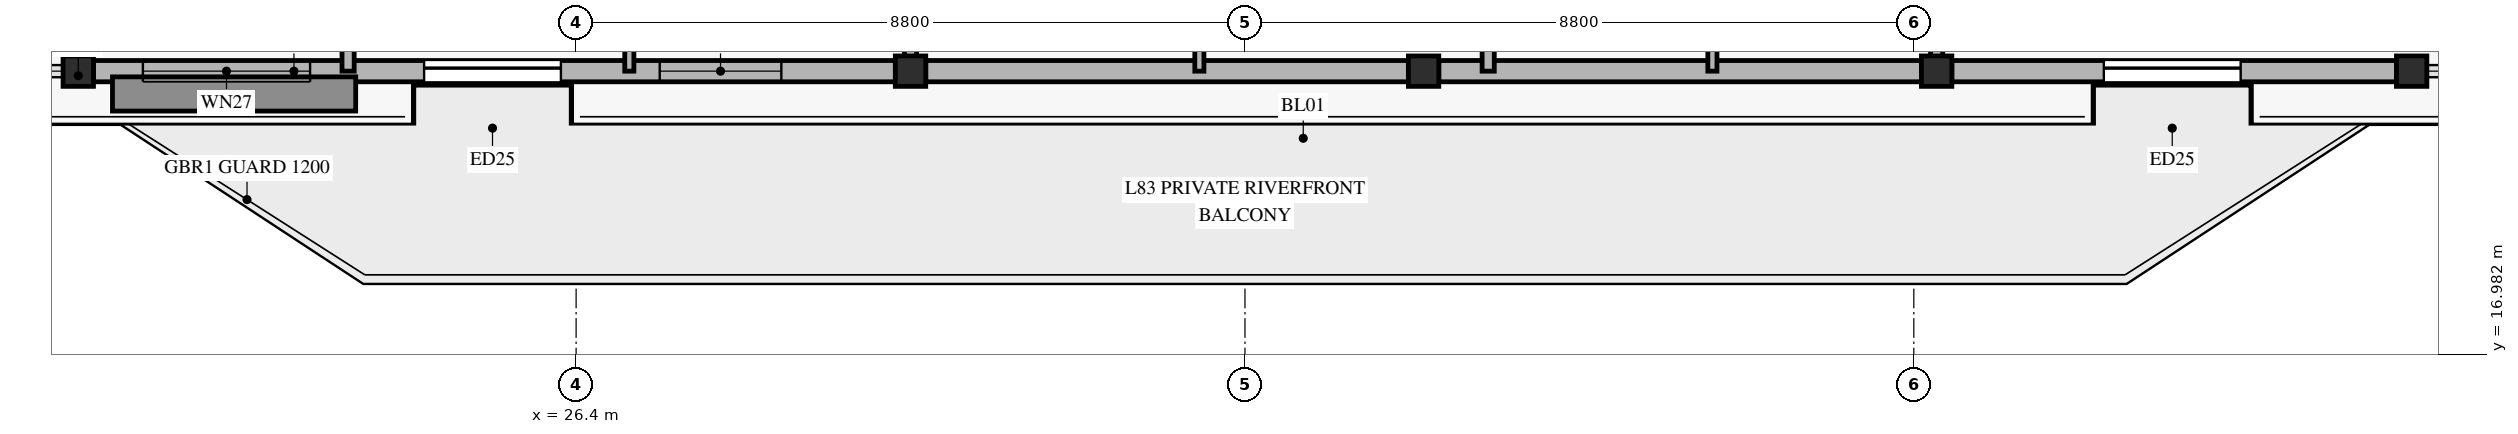
"""IFC4 building model, lengths in metres.
Left out: names, types, materials, properties, quantities, classifications, styles, units other than length and angle.
Written with IfcOpenShell. Run it as: python <this file> out.ifc"""

import sys

from ifc_helpers import new_model, si_unit, direction, frame, frame_2d, origin, origin_2d, place, context, subcontext, project, spatial, rectangle, hollow_rectangle, extrude, source, transform, mapped, element, fill, save


model = new_model("IFC4")
c1 = context("Model", 3, precision=1e-05, world=origin(), true_north=direction((0.0, 1.0)))
c2 = subcontext(c1, "Body", "Model", "MODEL_VIEW")
j1 = project(units=[si_unit("LENGTHUNIT", "METRE"), si_unit("PLANEANGLEUNIT", "RADIAN")], contexts=[c1])
p1 = place(None, origin())
s1 = spatial("IfcSite", under=j1, at=p1, CompositionType="ELEMENT")
p2 = place(p1, origin())
s2 = spatial("IfcBuilding", under=s1, at=p2, CompositionType="ELEMENT")
p3 = place(p2, frame((0.0, 0.0, 321.0)))
s3 = spatial("IfcBuildingStorey", under=s2, at=p3, CompositionType="ELEMENT", Elevation=321.0)
m1 = source(origin(), c2, "Body", "SweptSolid", [
    extrude(hollow_rectangle(XDim=0.4, YDim=0.4, WallThickness=0.02, at=origin_2d()), origin(), (0.0, 0.0, 1.0), 3.319),
])
for number, where, z_axis, x_axis in (
    (1, (19.85, 20.704, 0.0), (0.0, 0.281, 0.96), (-1.0, 0.0, 0.0)),
    (2, (30.8, 20.704, 0.0), (0.0, 0.281, 0.96), (-1.0, 0.0, 0.0)),
    (3, (37.55, 20.704, 0.0), (0.0, 0.281, 0.96), (-1.0, 0.0, 0.0)),
    (4, (44.3, 20.704, 0.0), (0.0, 0.281, 0.96), (-1.0, 0.0, 0.0)),
    (5, (50.55, 20.704, 0.0), (0.0, 0.281, 0.96), (-1.0, 0.0, 0.0)),
):
    element("IfcColumn", number, at=place(p3, frame(where, z_axis=z_axis, x_axis=x_axis)), inside=s3, PredefinedType="COLUMN", context=c2, shape_type="MappedRepresentation", body=[
        mapped(m1, transform((0.0, 0.0, 0.0), x_axis=(1.0, 0.0, 0.0), y_axis=(0.0, 1.0, 0.0), z_axis=(0.0, 0.0, 1.0), scale=1.0)),
    ])
p4 = place(p3, frame((20.05, 20.704, 0.0), z_axis=(0.0, 0.0, 1.0), x_axis=(1.0, 0.0, 0.0)))
e6 = element("IfcWall", 6, at=p4, inside=s3, PredefinedType="SOLIDWALL", context=c2, shape_type="SweptSolid", body=[
    extrude(rectangle(XDim=10.55, YDim=0.28, at=frame_2d((5.275, 0.0))), origin(), (0.0, 0.0, 1.0), 2.815),
])
p5 = place(p4, frame((4.35, 0.0, 0.0)))
e7 = element("IfcOpeningElement", 7, at=p5, cuts=e6, PredefinedType="OPENING", context=c2, shape_type="SweptSolid", body=[
    extrude(rectangle(XDim=1.8, YDim=2.25, at=frame_2d((0.9, 1.125))), frame((0.0, 0.15, 0.0), z_axis=(0.0, -1.0, 0.0), x_axis=(1.0, 0.0, 0.0)), (0.0, 0.0, 1.0), 0.3),
])
p6 = place(p4, frame((0.65, 0.0, 0.45)))
e8 = element("IfcOpeningElement", 8, at=p6, cuts=e6, PredefinedType="OPENING", context=c2, shape_type="SweptSolid", body=[
    extrude(rectangle(XDim=2.2, YDim=2.1, at=frame_2d((1.1, 1.05))), frame((0.0, 0.15, 0.0), z_axis=(0.0, -1.0, 0.0), x_axis=(1.0, 0.0, 0.0)), (0.0, 0.0, 1.0), 0.3),
])
p7 = place(p4, frame((7.45, 0.0, 0.45)))
e9 = element("IfcOpeningElement", 9, at=p7, cuts=e6, PredefinedType="OPENING", context=c2, shape_type="SweptSolid", body=[
    extrude(rectangle(XDim=1.6, YDim=2.0, at=frame_2d((0.8, 1.0))), frame((0.0, 0.15, 0.0), z_axis=(0.0, -1.0, 0.0), x_axis=(1.0, 0.0, 0.0)), (0.0, 0.0, 1.0), 0.3),
])
for number, where, z_axis, x_axis in (
    (10, (31.0, 20.704, 0.0), (0.0, 0.0, 1.0), (1.0, 0.0, 0.0)),
    (11, (37.75, 20.704, 0.0), (0.0, 0.0, 1.0), (1.0, 0.0, 0.0)),
):
    element("IfcWall", number, at=place(p3, frame(where, z_axis=z_axis, x_axis=x_axis)), inside=s3, PredefinedType="SOLIDWALL", context=c2, shape_type="SweptSolid", body=[
        extrude(rectangle(XDim=6.35, YDim=0.28, at=frame_2d((3.175, 0.0))), origin(), (0.0, 0.0, 1.0), 2.815),
    ])
p8 = place(p3, frame((44.5, 20.704, 0.0), z_axis=(0.0, 0.0, 1.0), x_axis=(1.0, 0.0, 0.0)))
e12 = element("IfcWall", 12, at=p8, inside=s3, PredefinedType="SOLIDWALL", context=c2, shape_type="SweptSolid", body=[
    extrude(rectangle(XDim=5.85, YDim=0.28, at=frame_2d((2.925, 0.0))), origin(), (0.0, 0.0, 1.0), 2.815),
])
p9 = place(p8, frame((2.0, 0.0, 0.0)))
e13 = element("IfcOpeningElement", 13, at=p9, cuts=e12, PredefinedType="OPENING", context=c2, shape_type="SweptSolid", body=[
    extrude(rectangle(XDim=1.8, YDim=2.25, at=frame_2d((0.9, 1.125))), frame((0.0, 0.15, 0.0), z_axis=(0.0, -1.0, 0.0), x_axis=(1.0, 0.0, 0.0)), (0.0, 0.0, 1.0), 0.3),
])
p10 = place(p3, frame((23.4, 20.704, 0.0), z_axis=(0.0, 0.0, 1.0), x_axis=(0.0, 1.0, 0.0)))
e14 = element("IfcWall", 14, at=p10, inside=s3, PredefinedType="PARTITIONING", context=c2, shape_type="SweptSolid", body=[
    extrude(rectangle(XDim=16.746, YDim=0.16, at=frame_2d((8.373, 0.0))), origin(), (0.0, 0.0, 1.0), 2.77),
])
p11 = place(p10, frame((13.766, 0.0, 0.0)))
e15 = element("IfcOpeningElement", 15, at=p11, cuts=e14, PredefinedType="OPENING", context=c2, shape_type="SweptSolid", body=[
    extrude(rectangle(XDim=1.05, YDim=2.15, at=frame_2d((0.525, 1.075))), frame((0.0, 0.09, 0.0), z_axis=(0.0, -1.0, 0.0), x_axis=(1.0, 0.0, 0.0)), (0.0, 0.0, 1.0), 0.18),
])
p12 = place(p3, frame((30.8, 20.704, 0.0), z_axis=(0.0, 0.0, 1.0), x_axis=(0.0, 1.0, 0.0)))
e16 = element("IfcWall", 16, at=p12, inside=s3, PredefinedType="PARTITIONING", context=c2, shape_type="SweptSolid", body=[
    extrude(rectangle(XDim=13.346, YDim=0.16, at=frame_2d((6.673, 0.0))), origin(), (0.0, 0.0, 1.0), 2.47),
])
p13 = place(p3, frame((38.4, 20.704, 0.0), z_axis=(0.0, 0.0, 1.0), x_axis=(0.0, 1.0, 0.0)))
e17 = element("IfcWall", 17, at=p13, inside=s3, PredefinedType="PARTITIONING", context=c2, shape_type="SweptSolid", body=[
    extrude(rectangle(XDim=13.346, YDim=0.16, at=frame_2d((6.673, 0.0))), origin(), (0.0, 0.0, 1.0), 2.77),
])
p14 = place(p3, frame((44.3, 20.704, 0.0), z_axis=(0.0, 0.0, 1.0), x_axis=(0.0, 1.0, 0.0)))
e18 = element("IfcWall", 18, at=p14, inside=s3, PredefinedType="PARTITIONING", context=c2, shape_type="SweptSolid", body=[
    extrude(rectangle(XDim=16.746, YDim=0.16, at=frame_2d((8.373, 0.0))), origin(), (0.0, 0.0, 1.0), 2.47),
])
p15 = place(p14, frame((13.766, 0.0, 0.0)))
e19 = element("IfcOpeningElement", 19, at=p15, cuts=e18, PredefinedType="OPENING", context=c2, shape_type="SweptSolid", body=[
    extrude(rectangle(XDim=1.05, YDim=2.15, at=frame_2d((0.525, 1.075))), frame((0.0, 0.09, 0.0), z_axis=(0.0, -1.0, 0.0), x_axis=(1.0, 0.0, 0.0)), (0.0, 0.0, 1.0), 0.18),
])
p16 = place(p3, frame((27.1, 20.704, 0.0), z_axis=(0.0, 0.0, 1.0), x_axis=(0.0, 1.0, 0.0)))
e20 = element("IfcWall", 20, at=p16, inside=s3, PredefinedType="PARTITIONING", context=c2, shape_type="SweptSolid", body=[
    extrude(rectangle(XDim=10.696, YDim=0.12, at=frame_2d((5.348, 0.0))), origin(), (0.0, 0.0, 1.0), 2.77),
])
p17 = place(p16, frame((1.732, 0.0, 0.0)))
e21 = element("IfcOpeningElement", 21, at=p17, cuts=e20, PredefinedType="OPENING", context=c2, shape_type="SweptSolid", body=[
    extrude(rectangle(XDim=0.95, YDim=2.1, at=frame_2d((0.475, 1.05))), frame((0.0, 0.07, 0.0), z_axis=(0.0, -1.0, 0.0), x_axis=(1.0, 0.0, 0.0)), (0.0, 0.0, 1.0), 0.14),
])
p18 = place(p3, frame((34.6, 20.704, 0.0), z_axis=(0.0, 0.0, 1.0), x_axis=(0.0, 1.0, 0.0)))
e22 = element("IfcWall", 22, at=p18, inside=s3, PredefinedType="PARTITIONING", context=c2, shape_type="SweptSolid", body=[
    extrude(rectangle(XDim=10.696, YDim=0.12, at=frame_2d((5.348, 0.0))), origin(), (0.0, 0.0, 1.0), 2.77),
])
p19 = place(p18, frame((2.652, 0.0, 0.0)))
e23 = element("IfcOpeningElement", 23, at=p19, cuts=e22, PredefinedType="OPENING", context=c2, shape_type="SweptSolid", body=[
    extrude(rectangle(XDim=0.95, YDim=2.1, at=frame_2d((0.475, 1.05))), frame((0.0, 0.07, 0.0), z_axis=(0.0, -1.0, 0.0), x_axis=(1.0, 0.0, 0.0)), (0.0, 0.0, 1.0), 0.14),
])
p20 = place(p3, frame((41.35, 20.704, 0.0), z_axis=(0.0, 0.0, 1.0), x_axis=(0.0, 1.0, 0.0)))
e24 = element("IfcWall", 24, at=p20, inside=s3, PredefinedType="PARTITIONING", context=c2, shape_type="SweptSolid", body=[
    extrude(rectangle(XDim=10.696, YDim=0.12, at=frame_2d((5.348, 0.0))), origin(), (0.0, 0.0, 1.0), 2.77),
])
p21 = place(p20, frame((2.652, 0.0, 0.0)))
e25 = element("IfcOpeningElement", 25, at=p21, cuts=e24, PredefinedType="OPENING", context=c2, shape_type="SweptSolid", body=[
    extrude(rectangle(XDim=0.95, YDim=2.1, at=frame_2d((0.475, 1.05))), frame((0.0, 0.07, 0.0), z_axis=(0.0, -1.0, 0.0), x_axis=(1.0, 0.0, 0.0)), (0.0, 0.0, 1.0), 0.14),
])
m2 = source(origin(), c2, "Body", "SweptSolid", [
    extrude(rectangle(XDim=1.8, YDim=2.25, at=frame_2d((0.9, 1.125))), frame((0.0, 0.025, 0.0), z_axis=(0.0, -1.0, 0.0), x_axis=(1.0, 0.0, 0.0)), (0.0, 0.0, 1.0), 0.05),
])
p22 = place(p5, origin())
e26 = element("IfcDoor", 26, at=p22, inside=s3, OperationType="SLIDING_TO_LEFT", PredefinedType="DOOR", context=c2, shape_type="MappedRepresentation", body=[
    mapped(m2, transform((0.0, 0.0, 0.0), x_axis=(1.0, 0.0, 0.0), y_axis=(0.0, 1.0, 0.0), z_axis=(0.0, 0.0, 1.0), scale=1.0)),
])
fill(e7, e26)
m3 = source(origin(), c2, "Body", "SweptSolid", [
    extrude(rectangle(XDim=2.2, YDim=2.1, at=frame_2d((1.1, 1.05))), frame((0.0, 0.03, 0.0), z_axis=(0.0, -1.0, 0.0), x_axis=(1.0, 0.0, 0.0)), (0.0, 0.0, 1.0), 0.06),
])
p23 = place(p6, origin())
e27 = element("IfcWindow", 27, at=p23, inside=s3, PartitioningType="SINGLE_PANEL", PredefinedType="WINDOW", context=c2, shape_type="MappedRepresentation", body=[
    mapped(m3, transform((0.0, 0.0, 0.0), x_axis=(1.0, 0.0, 0.0), y_axis=(0.0, 1.0, 0.0), z_axis=(0.0, 0.0, 1.0), scale=1.0)),
])
fill(e8, e27)
m4 = source(origin(), c2, "Body", "SweptSolid", [
    extrude(rectangle(XDim=1.6, YDim=2.0, at=frame_2d((0.8, 1.0))), frame((0.0, 0.03, 0.0), z_axis=(0.0, -1.0, 0.0), x_axis=(1.0, 0.0, 0.0)), (0.0, 0.0, 1.0), 0.06),
])
p24 = place(p7, origin())
e28 = element("IfcWindow", 28, at=p24, inside=s3, PartitioningType="SINGLE_PANEL", PredefinedType="WINDOW", context=c2, shape_type="MappedRepresentation", body=[
    mapped(m4, transform((0.0, 0.0, 0.0), x_axis=(1.0, 0.0, 0.0), y_axis=(0.0, 1.0, 0.0), z_axis=(0.0, 0.0, 1.0), scale=1.0)),
])
fill(e9, e28)
p25 = place(p9, origin())
e29 = element("IfcDoor", 29, at=p25, inside=s3, OperationType="SLIDING_TO_LEFT", PredefinedType="DOOR", context=c2, shape_type="MappedRepresentation", body=[
    mapped(m2, transform((0.0, 0.0, 0.0), x_axis=(1.0, 0.0, 0.0), y_axis=(0.0, 1.0, 0.0), z_axis=(0.0, 0.0, 1.0), scale=1.0)),
])
fill(e13, e29)
save(model, sys.argv[1])
